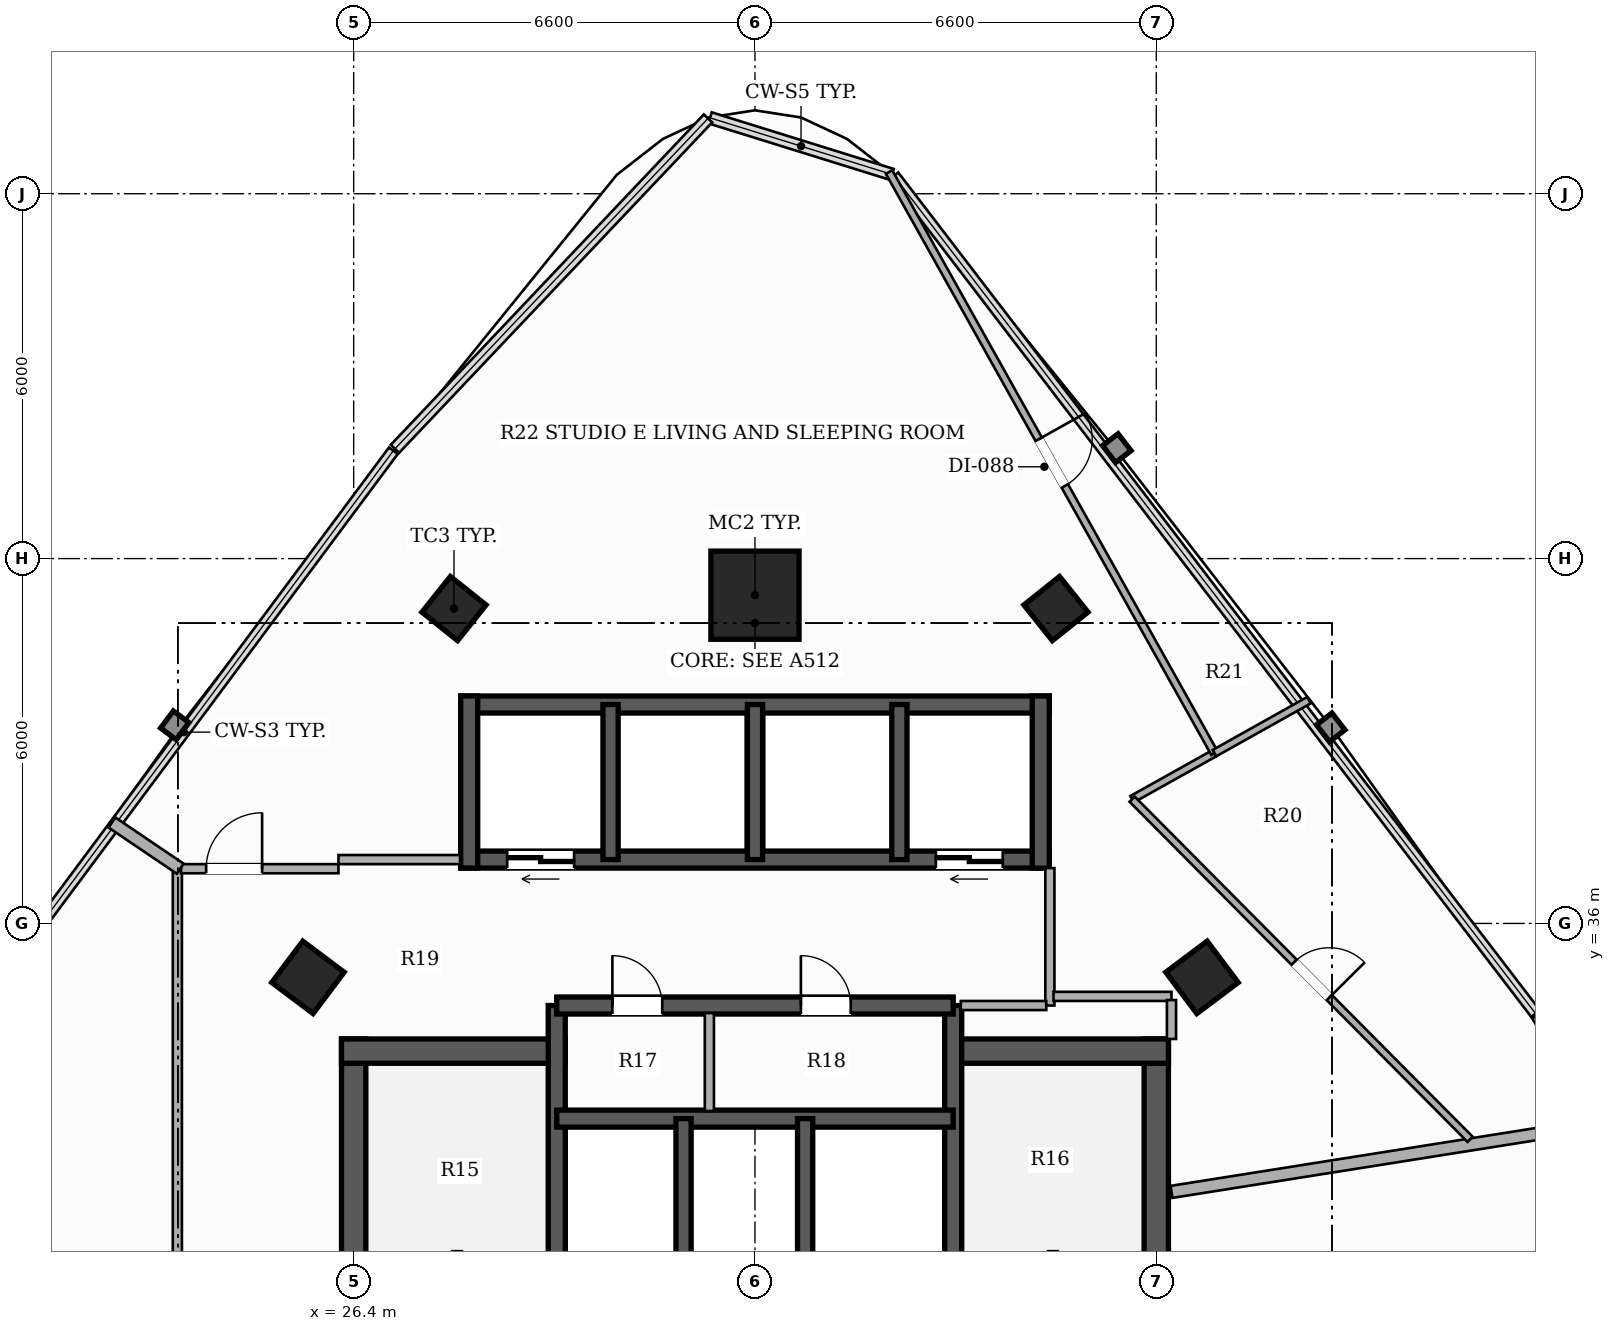
"""IFC4 building model, lengths in metres.
Left out: names, types, materials, properties, quantities, classifications, styles, units other than length and angle.
Written with IfcOpenShell. Run it as: python <this file> out.ifc"""

import sys

from ifc_helpers import new_model, si_unit, direction, frame, frame_2d, origin, origin_2d, place, context, subcontext, project, spatial, rectangle, hollow_rectangle, extrude, element, fill, save


model = new_model("IFC4")
c1 = context("Model", 3, precision=1e-05, world=origin(), true_north=direction((0.0, 1.0)))
c2 = subcontext(c1, "Body", "Model", "MODEL_VIEW")
j1 = project(units=[si_unit("LENGTHUNIT", "METRE"), si_unit("PLANEANGLEUNIT", "RADIAN")], contexts=[c1])
p1 = place(None, origin())
s1 = spatial("IfcSite", under=j1, at=p1, CompositionType="ELEMENT")
p2 = place(p1, origin())
s2 = spatial("IfcBuilding", under=s1, at=p2, CompositionType="ELEMENT")
p3 = place(p2, frame((0.0, 0.0, 119.9)))
s3 = spatial("IfcBuildingStorey", under=s2, at=p3, CompositionType="ELEMENT", Elevation=119.9)
p4 = place(p3, frame((26.4, 26.5, 0.0), z_axis=(0.0, 0.0, 1.0), x_axis=(0.0, 1.0, 0.0)))
e1 = element("IfcWall", 1, at=p4, inside=s3, PredefinedType="SHEAR", context=c2, shape_type="SweptSolid", body=[
    extrude(rectangle(XDim=7.6, YDim=0.4, at=frame_2d((3.8, 0.0))), origin(), (0.0, 0.0, 1.0), 3.3),
])
p5 = place(p3, frame((26.2, 33.9, 0.0), z_axis=(0.0, 0.0, 1.0), x_axis=(1.0, 0.0, 0.0)))
e2 = element("IfcWall", 2, at=p5, inside=s3, PredefinedType="SHEAR", context=c2, shape_type="SweptSolid", body=[
    extrude(rectangle(XDim=3.68, YDim=0.4, at=frame_2d((1.84, 0.0))), origin(), (0.0, 0.0, 1.0), 3.3),
])
p6 = place(p3, frame((39.6, 26.5, 0.0), z_axis=(0.0, 0.0, 1.0), x_axis=(0.0, 1.0, 0.0)))
e3 = element("IfcWall", 3, at=p6, inside=s3, PredefinedType="SHEAR", context=c2, shape_type="SweptSolid", body=[
    extrude(rectangle(XDim=7.6, YDim=0.4, at=frame_2d((3.8, 0.0))), origin(), (0.0, 0.0, 1.0), 3.3),
])
p7 = place(p3, frame((36.12, 33.9, 0.0), z_axis=(0.0, 0.0, 1.0), x_axis=(1.0, 0.0, 0.0)))
e4 = element("IfcWall", 4, at=p7, inside=s3, PredefinedType="SHEAR", context=c2, shape_type="SweptSolid", body=[
    extrude(rectangle(XDim=3.68, YDim=0.4, at=frame_2d((1.84, 0.0))), origin(), (0.0, 0.0, 1.0), 3.3),
])
p8 = place(p3, frame((29.74, 26.5, 0.0), z_axis=(0.0, 0.0, 1.0), x_axis=(0.0, 1.0, 0.0)))
e5 = element("IfcWall", 5, at=p8, inside=s3, PredefinedType="SHEAR", context=c2, shape_type="SweptSolid", body=[
    extrude(rectangle(XDim=8.15, YDim=0.28, at=frame_2d((4.075, 0.0))), origin(), (0.0, 0.0, 1.0), 3.3),
])
p9 = place(p8, frame((0.6, 0.0, 0.0)))
e6 = element("IfcOpeningElement", 6, at=p9, cuts=e5, PredefinedType="OPENING", context=c2, shape_type="SweptSolid", body=[
    extrude(rectangle(XDim=1.05, YDim=2.15, at=frame_2d((0.525, 1.075))), frame((0.0, 0.15, 0.0), z_axis=(0.0, -1.0, 0.0), x_axis=(1.0, 0.0, 0.0)), (0.0, 0.0, 1.0), 0.3),
])
p10 = place(p3, frame((36.26, 26.5, 0.0), z_axis=(0.0, 0.0, 1.0), x_axis=(0.0, 1.0, 0.0)))
e7 = element("IfcWall", 7, at=p10, inside=s3, PredefinedType="SHEAR", context=c2, shape_type="SweptSolid", body=[
    extrude(rectangle(XDim=8.15, YDim=0.28, at=frame_2d((4.075, 0.0))), origin(), (0.0, 0.0, 1.0), 3.3),
])
p11 = place(p10, frame((0.6, 0.0, 0.0)))
e8 = element("IfcOpeningElement", 8, at=p11, cuts=e7, PredefinedType="OPENING", context=c2, shape_type="SweptSolid", body=[
    extrude(rectangle(XDim=1.05, YDim=2.15, at=frame_2d((0.525, 1.075))), frame((0.0, 0.15, 0.0), z_axis=(0.0, -1.0, 0.0), x_axis=(1.0, 0.0, 0.0)), (0.0, 0.0, 1.0), 0.3),
])
p12 = place(p3, frame((29.74, 32.79, 0.0), z_axis=(0.0, 0.0, 1.0), x_axis=(1.0, 0.0, 0.0)))
e9 = element("IfcWall", 9, at=p12, inside=s3, PredefinedType="SHEAR", context=c2, shape_type="SweptSolid", body=[
    extrude(rectangle(XDim=6.52, YDim=0.28, at=frame_2d((3.26, 0.0))), origin(), (0.0, 0.0, 1.0), 3.3),
])
for number, where, z_axis, x_axis in (
    (10, (31.825, 29.89, 0.0), (0.0, 0.0, 1.0), (0.0, 1.0, 0.0)),
    (11, (33.825, 29.89, 0.0), (0.0, 0.0, 1.0), (0.0, 1.0, 0.0)),
):
    element("IfcWall", number, at=place(p3, frame(where, z_axis=z_axis, x_axis=x_axis)), inside=s3, PredefinedType="SHEAR", context=c2, shape_type="SweptSolid", body=[
        extrude(rectangle(XDim=2.9, YDim=0.25, at=frame_2d((1.45, 0.0))), origin(), (0.0, 0.0, 1.0), 3.3),
    ])
p13 = place(p3, frame((29.74, 34.65, 0.0), z_axis=(0.0, 0.0, 1.0), x_axis=(1.0, 0.0, 0.0)))
e12 = element("IfcWall", 12, at=p13, inside=s3, PredefinedType="SHEAR", context=c2, shape_type="SweptSolid", body=[
    extrude(rectangle(XDim=6.52, YDim=0.28, at=frame_2d((3.26, 0.0))), origin(), (0.0, 0.0, 1.0), 3.3),
])
p14 = place(p13, frame((0.915, 0.0, 0.0)))
e13 = element("IfcOpeningElement", 13, at=p14, cuts=e12, PredefinedType="OPENING", context=c2, shape_type="SweptSolid", body=[
    extrude(rectangle(XDim=0.82, YDim=2.1, at=frame_2d((0.41, 1.05))), frame((0.0, 0.15, 0.0), z_axis=(0.0, -1.0, 0.0), x_axis=(1.0, 0.0, 0.0)), (0.0, 0.0, 1.0), 0.3),
])
p15 = place(p13, frame((4.015, 0.0, 0.0)))
e14 = element("IfcOpeningElement", 14, at=p15, cuts=e12, PredefinedType="OPENING", context=c2, shape_type="SweptSolid", body=[
    extrude(rectangle(XDim=0.82, YDim=2.1, at=frame_2d((0.41, 1.05))), frame((0.0, 0.15, 0.0), z_axis=(0.0, -1.0, 0.0), x_axis=(1.0, 0.0, 0.0)), (0.0, 0.0, 1.0), 0.3),
])
p16 = place(p3, frame((37.84, 37.05, 0.0), z_axis=(0.0, 0.0, 1.0), x_axis=(-1.0, 0.0, 0.0)))
e15 = element("IfcWall", 15, at=p16, inside=s3, PredefinedType="SHEAR", context=c2, shape_type="SweptSolid", body=[
    extrude(rectangle(XDim=9.68, YDim=0.28, at=frame_2d((4.84, 0.0))), origin(), (0.0, 0.0, 1.0), 3.3),
])
p17 = place(p16, frame((7.815, 0.0, 0.0)))
e16 = element("IfcOpeningElement", 16, at=p17, cuts=e15, PredefinedType="OPENING", context=c2, shape_type="SweptSolid", body=[
    extrude(rectangle(XDim=1.1, YDim=2.2, at=frame_2d((0.55, 1.1))), frame((0.0, 0.15, 0.0), z_axis=(0.0, -1.0, 0.0), x_axis=(1.0, 0.0, 0.0)), (0.0, 0.0, 1.0), 0.3),
])
p18 = place(p16, frame((0.765, 0.0, 0.0)))
e17 = element("IfcOpeningElement", 17, at=p18, cuts=e15, PredefinedType="OPENING", context=c2, shape_type="SweptSolid", body=[
    extrude(rectangle(XDim=1.1, YDim=2.2, at=frame_2d((0.55, 1.1))), frame((0.0, 0.15, 0.0), z_axis=(0.0, -1.0, 0.0), x_axis=(1.0, 0.0, 0.0)), (0.0, 0.0, 1.0), 0.3),
])
p19 = place(p3, frame((28.16, 39.6, 0.0), z_axis=(0.0, 0.0, 1.0), x_axis=(1.0, 0.0, 0.0)))
e18 = element("IfcWall", 18, at=p19, inside=s3, PredefinedType="SHEAR", context=c2, shape_type="SweptSolid", body=[
    extrude(rectangle(XDim=9.68, YDim=0.28, at=frame_2d((4.84, 0.0))), origin(), (0.0, 0.0, 1.0), 3.3),
])
for number, where, z_axis, x_axis in (
    (19, (28.3, 36.91, 0.0), (0.0, 0.0, 1.0), (0.0, 1.0, 0.0)),
    (20, (37.7, 36.91, 0.0), (0.0, 0.0, 1.0), (0.0, 1.0, 0.0)),
):
    element("IfcWall", number, at=place(p3, frame(where, z_axis=z_axis, x_axis=x_axis)), inside=s3, PredefinedType="SHEAR", context=c2, shape_type="SweptSolid", body=[
        extrude(rectangle(XDim=2.83, YDim=0.28, at=frame_2d((1.415, 0.0))), origin(), (0.0, 0.0, 1.0), 3.3),
    ])
for number, where, z_axis, x_axis in (
    (21, (30.625, 37.05, 0.0), (0.0, 0.0, 1.0), (0.0, 1.0, 0.0)),
    (22, (33.0, 37.05, 0.0), (0.0, 0.0, 1.0), (0.0, 1.0, 0.0)),
    (23, (35.375, 37.05, 0.0), (0.0, 0.0, 1.0), (0.0, 1.0, 0.0)),
):
    element("IfcWall", number, at=place(p3, frame(where, z_axis=z_axis, x_axis=x_axis)), inside=s3, PredefinedType="SHEAR", context=c2, shape_type="SweptSolid", body=[
        extrude(rectangle(XDim=2.55, YDim=0.25, at=frame_2d((1.275, 0.0))), origin(), (0.0, 0.0, 1.0), 3.3),
    ])
p20 = place(p3, frame((33.0, 41.398, 0.0), z_axis=(0.0, 0.0, 1.0), x_axis=(1.0, 0.0, 0.0)))
e24 = element("IfcColumn", 24, at=p20, inside=s3, PredefinedType="COLUMN", context=c2, shape_type="SweptSolid", body=[
    extrude(hollow_rectangle(XDim=1.45, YDim=1.45, WallThickness=0.045, at=origin_2d()), origin(), (0.0, 0.0, 1.0), 3.3),
])
for number, where, z_axis, x_axis in (
    (25, (25.648, 35.113, 0.0), (0.0, 0.0, 1.0), (0.6, 0.8, 0.0)),
    (26, (40.352, 35.113, 0.0), (0.0, 0.0, 1.0), (-0.6, 0.8, 0.0)),
):
    element("IfcColumn", number, at=place(p3, frame(where, z_axis=z_axis, x_axis=x_axis)), inside=s3, PredefinedType="COLUMN", context=c2, shape_type="SweptSolid", body=[
        extrude(hollow_rectangle(XDim=0.85, YDim=0.85, WallThickness=0.028, at=origin_2d()), origin(), (0.0, 0.0, 1.0), 3.3),
    ])
for number, where, z_axis, x_axis in (
    (27, (28.05, 41.178, 0.0), (0.0, 0.0, 1.0), (0.624, 0.782, 0.0)),
    (28, (37.95, 41.178, 0.0), (0.0, 0.0, 1.0), (-0.624, 0.782, 0.0)),
):
    element("IfcColumn", number, at=place(p3, frame(where, z_axis=z_axis, x_axis=x_axis)), inside=s3, PredefinedType="COLUMN", context=c2, shape_type="SweptSolid", body=[
        extrude(hollow_rectangle(XDim=0.75, YDim=0.75, WallThickness=0.025, at=origin_2d()), origin(), (0.0, 0.0, 1.0), 3.3),
    ])
p21 = place(p3, frame((37.85, 34.65, 0.0), z_axis=(0.0, 0.0, 1.0), x_axis=(0.0, 1.0, 0.0)))
e29 = element("IfcWall", 29, at=p21, inside=s3, PredefinedType="PARTITIONING", context=c2, shape_type="SweptSolid", body=[
    extrude(rectangle(XDim=2.26, YDim=0.15, at=frame_2d((1.13, 0.0))), origin(), (0.0, 0.0, 1.0), 3.06),
])
p22 = place(p3, frame((36.385, 34.65, 0.0), z_axis=(0.0, 0.0, 1.0), x_axis=(1.0, 0.0, 0.0)))
e30 = element("IfcWall", 30, at=p22, inside=s3, PredefinedType="PARTITIONING", context=c2, shape_type="SweptSolid", body=[
    extrude(rectangle(XDim=1.405, YDim=0.15, at=frame_2d((0.703, 0.0))), origin(), (0.0, 0.0, 1.0), 2.425),
])
p23 = place(p3, frame((32.25, 32.915, 0.0), z_axis=(0.0, 0.0, 1.0), x_axis=(0.0, 1.0, 0.0)))
e31 = element("IfcWall", 31, at=p23, inside=s3, PredefinedType="PARTITIONING", context=c2, shape_type="SweptSolid", body=[
    extrude(rectangle(XDim=1.61, YDim=0.15, at=frame_2d((0.805, 0.0))), origin(), (0.0, 0.0, 1.0), 3.06),
])
p24 = place(p3, frame((23.5, 14.06, 0.0), z_axis=(0.0, 0.0, 1.0), x_axis=(0.0, 1.0, 0.0)))
e32 = element("IfcWall", 32, at=p24, inside=s3, PredefinedType="PARTITIONING", context=c2, shape_type="SweptSolid", body=[
    extrude(rectangle(XDim=22.84, YDim=0.15, at=frame_2d((11.42, 0.0))), origin(), (0.0, 0.0, 1.0), 2.413),
])
p25 = place(p24, frame((13.17, 0.0, 0.0)))
e33 = element("IfcOpeningElement", 33, at=p25, cuts=e32, PredefinedType="OPENING", context=c2, shape_type="SweptSolid", body=[
    extrude(rectangle(XDim=0.88, YDim=2.1, at=frame_2d((0.44, 1.05))), frame((0.0, 0.085, 0.0), z_axis=(0.0, -1.0, 0.0), x_axis=(1.0, 0.0, 0.0)), (0.0, 0.0, 1.0), 0.17),
])
p26 = place(p3, frame((23.56, 36.9, 0.0), z_axis=(0.0, 0.0, 1.0), x_axis=(1.0, 0.0, 0.0)))
e34 = element("IfcWall", 34, at=p26, inside=s3, PredefinedType="PARTITIONING", context=c2, shape_type="SweptSolid", body=[
    extrude(rectangle(XDim=2.59, YDim=0.15, at=frame_2d((1.295, 0.0))), origin(), (0.0, 0.0, 1.0), 2.413),
])
p27 = place(p26, frame((0.414, 0.0, 0.0)))
e35 = element("IfcOpeningElement", 35, at=p27, cuts=e34, PredefinedType="OPENING", context=c2, shape_type="SweptSolid", body=[
    extrude(rectangle(XDim=0.92, YDim=2.15, at=frame_2d((0.46, 1.075))), frame((0.0, 0.085, 0.0), z_axis=(0.0, -1.0, 0.0), x_axis=(1.0, 0.0, 0.0)), (0.0, 0.0, 1.0), 0.17),
])
p28 = place(p3, frame((26.15, 37.05, 0.0), z_axis=(0.0, 0.0, 1.0), x_axis=(1.0, 0.0, 0.0)))
e36 = element("IfcWall", 36, at=p28, inside=s3, PredefinedType="PARTITIONING", context=c2, shape_type="SweptSolid", body=[
    extrude(rectangle(XDim=2.0, YDim=0.15, at=frame_2d((1.0, 0.0))), origin(), (0.0, 0.0, 1.0), 2.413),
])
p29 = place(p3, frame((37.91, 34.8, 0.0), z_axis=(0.0, 0.0, 1.0), x_axis=(1.0, 0.0, 0.0)))
e37 = element("IfcWall", 37, at=p29, inside=s3, PredefinedType="PARTITIONING", context=c2, shape_type="SweptSolid", body=[
    extrude(rectangle(XDim=1.94, YDim=0.15, at=frame_2d((0.97, 0.0))), origin(), (0.0, 0.0, 1.0), 2.721),
])
p30 = place(p3, frame((39.85, 34.74, 0.0), z_axis=(0.0, 0.0, 1.0), x_axis=(0.0, -1.0, 0.0)))
e38 = element("IfcWall", 38, at=p30, inside=s3, PredefinedType="PARTITIONING", context=c2, shape_type="SweptSolid", body=[
    extrude(rectangle(XDim=0.64, YDim=0.15, at=frame_2d((0.32, 0.0))), origin(), (0.0, 0.0, 1.0), 2.721),
])
p31 = place(p3, frame((22.424, 37.66, 0.0), z_axis=(0.0, 0.0, 1.0), x_axis=(0.82818018374, -0.560461937388, 0.0)))
e39 = element("IfcWall", 39, at=p31, inside=s3, PredefinedType="PARTITIONING", context=c2, shape_type="SweptSolid", body=[
    extrude(rectangle(XDim=1.356, YDim=0.2, at=frame_2d((0.678, 0.0))), origin(), (0.0, 0.0, 1.0), 3.06),
])
p32 = place(p3, frame((46.976, 32.714, 0.0), z_axis=(0.0, 0.0, 1.0), x_axis=(-0.987677489662, -0.156502959767, 0.0)))
e40 = element("IfcWall", 40, at=p32, inside=s3, PredefinedType="PARTITIONING", context=c2, shape_type="SweptSolid", body=[
    extrude(rectangle(XDim=7.215, YDim=0.2, at=frame_2d((3.607, 0.0))), origin(), (0.0, 0.0, 1.0), 2.413),
])
p33 = place(p3, frame((40.557, 38.8, 0.0), z_axis=(0.0, 0.0, 1.0), x_axis=(-0.872825188639, -0.488032980521, 0.0)))
e41 = element("IfcWall", 41, at=p33, inside=s3, PredefinedType="PARTITIONING", context=c2, shape_type="SweptSolid", body=[
    extrude(rectangle(XDim=1.551, YDim=0.12, at=frame_2d((0.776, 0.0))), origin(), (0.0, 0.0, 1.0), 2.413),
])
p34 = place(p3, frame((39.203, 38.043, 0.0), z_axis=(0.0, 0.0, 1.0), x_axis=(0.704889894519, -0.709316739267, 0.0)))
e42 = element("IfcWall", 42, at=p34, inside=s3, PredefinedType="PARTITIONING", context=c2, shape_type="SweptSolid", body=[
    extrude(rectangle(XDim=7.886, YDim=0.12, at=frame_2d((3.943, 0.0))), origin(), (0.0, 0.0, 1.0), 2.413),
])
p35 = place(p34, frame((3.78, 0.0, 0.0)))
e43 = element("IfcOpeningElement", 43, at=p35, cuts=e42, PredefinedType="OPENING", context=c2, shape_type="SweptSolid", body=[
    extrude(rectangle(XDim=0.82, YDim=2.1, at=frame_2d((0.41, 1.05))), frame((0.0, 0.07, 0.0), z_axis=(0.0, -1.0, 0.0), x_axis=(1.0, 0.0, 0.0)), (0.0, 0.0, 1.0), 0.14),
])
p36 = place(p3, frame((35.205, 48.357, 0.0), z_axis=(0.0, 0.0, 1.0), x_axis=(0.488599975334, -0.872507916356, 0.0)))
e44 = element("IfcWall", 44, at=p36, inside=s3, PredefinedType="PARTITIONING", context=c2, shape_type="SweptSolid", body=[
    extrude(rectangle(XDim=10.953, YDim=0.12, at=frame_2d((5.477, 0.0))), origin(), (0.0, 0.0, 1.0), 2.619),
])
p37 = place(p36, frame((5.037, 0.0, 0.0)))
e45 = element("IfcOpeningElement", 45, at=p37, cuts=e44, PredefinedType="OPENING", context=c2, shape_type="SweptSolid", body=[
    extrude(rectangle(XDim=0.88, YDim=2.1, at=frame_2d((0.44, 1.05))), frame((0.0, 0.07, 0.0), z_axis=(0.0, -1.0, 0.0), x_axis=(1.0, 0.0, 0.0)), (0.0, 0.0, 1.0), 0.14),
])
p38 = place(p3, frame((40.557, 38.801, 0.0), z_axis=(0.0, 0.0, 1.0), x_axis=(0.872620527381, 0.488398828002, 0.0)))
e46 = element("IfcWall", 46, at=p38, inside=s3, PredefinedType="PARTITIONING", context=c2, shape_type="SweptSolid", body=[
    extrude(rectangle(XDim=1.781, YDim=0.12, at=frame_2d((0.891, 0.0))), origin(), (0.0, 0.0, 1.0), 3.06),
])
p39 = place(p17, origin())
e47 = element("IfcDoor", 47, at=p39, inside=s3, OperationType="DOUBLE_DOOR_SLIDING", PredefinedType="DOOR", context=c2, shape_type="SweptSolid", body=[
    extrude(rectangle(XDim=1.1, YDim=2.2, at=frame_2d((0.55, 1.1))), frame((0.0, 0.025, 0.0), z_axis=(0.0, -1.0, 0.0), x_axis=(1.0, 0.0, 0.0)), (0.0, 0.0, 1.0), 0.05),
])
fill(e16, e47)
p40 = place(p18, origin())
e48 = element("IfcDoor", 48, at=p40, inside=s3, OperationType="DOUBLE_DOOR_SLIDING", PredefinedType="DOOR", context=c2, shape_type="SweptSolid", body=[
    extrude(rectangle(XDim=1.1, YDim=2.2, at=frame_2d((0.55, 1.1))), frame((0.0, 0.025, 0.0), z_axis=(0.0, -1.0, 0.0), x_axis=(1.0, 0.0, 0.0)), (0.0, 0.0, 1.0), 0.05),
])
fill(e17, e48)
p41 = place(p14, origin())
e49 = element("IfcDoor", 49, at=p41, inside=s3, OperationType="SINGLE_SWING_LEFT", PredefinedType="DOOR", context=c2, shape_type="SweptSolid", body=[
    extrude(rectangle(XDim=0.82, YDim=2.1, at=frame_2d((0.41, 1.05))), frame((0.0, 0.025, 0.0), z_axis=(0.0, -1.0, 0.0), x_axis=(1.0, 0.0, 0.0)), (0.0, 0.0, 1.0), 0.05),
])
fill(e13, e49)
p42 = place(p15, origin())
e50 = element("IfcDoor", 50, at=p42, inside=s3, OperationType="SINGLE_SWING_LEFT", PredefinedType="DOOR", context=c2, shape_type="SweptSolid", body=[
    extrude(rectangle(XDim=0.82, YDim=2.1, at=frame_2d((0.41, 1.05))), frame((0.0, 0.025, 0.0), z_axis=(0.0, -1.0, 0.0), x_axis=(1.0, 0.0, 0.0)), (0.0, 0.0, 1.0), 0.05),
])
fill(e14, e50)
p43 = place(p27, origin())
e51 = element("IfcDoor", 51, at=p43, inside=s3, OperationType="SINGLE_SWING_RIGHT", PredefinedType="DOOR", context=c2, shape_type="SweptSolid", body=[
    extrude(rectangle(XDim=0.92, YDim=2.15, at=frame_2d((0.46, 1.075))), frame((0.0, 0.025, 0.0), z_axis=(0.0, -1.0, 0.0), x_axis=(1.0, 0.0, 0.0)), (0.0, 0.0, 1.0), 0.05),
])
fill(e35, e51)
p44 = place(p35, origin())
e52 = element("IfcDoor", 52, at=p44, inside=s3, OperationType="SINGLE_SWING_RIGHT", PredefinedType="DOOR", context=c2, shape_type="SweptSolid", body=[
    extrude(rectangle(XDim=0.82, YDim=2.1, at=frame_2d((0.41, 1.05))), frame((0.0, 0.025, 0.0), z_axis=(0.0, -1.0, 0.0), x_axis=(1.0, 0.0, 0.0)), (0.0, 0.0, 1.0), 0.05),
])
fill(e43, e52)
p45 = place(p37, origin())
e53 = element("IfcDoor", 53, at=p45, inside=s3, OperationType="SINGLE_SWING_LEFT", PredefinedType="DOOR", context=c2, shape_type="SweptSolid", body=[
    extrude(rectangle(XDim=0.88, YDim=2.1, at=frame_2d((0.44, 1.05))), frame((0.0, 0.025, 0.0), z_axis=(0.0, -1.0, 0.0), x_axis=(1.0, 0.0, 0.0)), (0.0, 0.0, 1.0), 0.05),
])
fill(e45, e53)
save(model, sys.argv[1])
